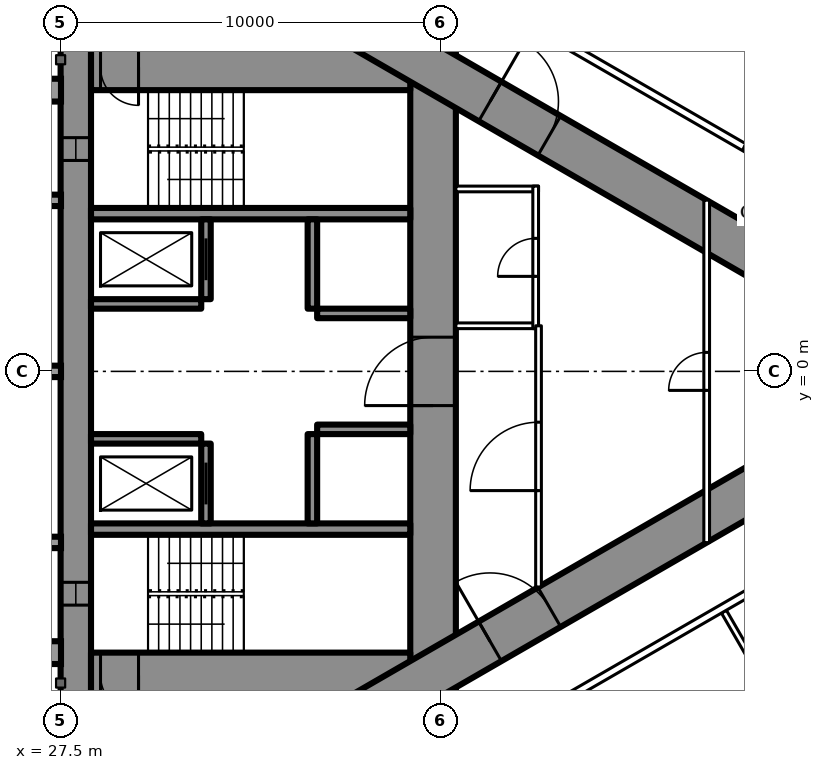
"""IFC4 building model, lengths in metres.
Left out: names, types, materials, properties, quantities, classifications, styles, units other than length and angle.
Written with IfcOpenShell. Run it as: python <this file> out.ifc"""

import sys

from ifc_helpers import new_model, si_unit, direction, frame, frame_2d, origin, place, context, subcontext, project, spatial, rectangle, extrude, element, fill, save


model = new_model("IFC4")
c1 = context("Model", 3, precision=1e-05, world=origin(), true_north=direction((0.0, 1.0)))
c2 = subcontext(c1, "Body", "Model", "MODEL_VIEW")
j1 = project(units=[si_unit("LENGTHUNIT", "METRE"), si_unit("PLANEANGLEUNIT", "RADIAN")], contexts=[c1])
p1 = place(None, origin())
s1 = spatial("IfcSite", under=j1, at=p1, CompositionType="ELEMENT")
p2 = place(p1, origin())
s2 = spatial("IfcBuilding", under=s1, at=p2, CompositionType="ELEMENT")
p3 = place(p2, frame((0.0, 0.0, 136.1)))
s3 = spatial("IfcBuildingStorey", under=s2, at=p3, CompositionType="ELEMENT", Elevation=136.1)
p4 = place(p3, frame((27.9, -8.6, 0.0), z_axis=(0.0, 0.0, 1.0), x_axis=(0.0, 1.0, 0.0)))
e1 = element("IfcWall", 1, at=p4, inside=s3, PredefinedType="SHEAR", context=c2, shape_type="SweptSolid", body=[
    extrude(rectangle(XDim=17.2, YDim=0.8, at=frame_2d((8.6, 0.0))), origin(), (0.0, 0.0, 1.0), 3.5),
])
p5 = place(p4, frame((2.45, 0.0, 0.6)))
e2 = element("IfcOpeningElement", 2, at=p5, cuts=e1, PredefinedType="OPENING", context=c2, shape_type="SweptSolid", body=[
    extrude(rectangle(XDim=0.6, YDim=2.1, at=frame_2d((0.3, 1.05))), frame((0.0, 0.41, 0.0), z_axis=(0.0, -1.0, 0.0), x_axis=(1.0, 0.0, 0.0)), (0.0, 0.0, 1.0), 0.82),
])
p6 = place(p4, frame((14.15, 0.0, 0.6)))
e3 = element("IfcOpeningElement", 3, at=p6, cuts=e1, PredefinedType="OPENING", context=c2, shape_type="SweptSolid", body=[
    extrude(rectangle(XDim=0.6, YDim=2.1, at=frame_2d((0.3, 1.05))), frame((0.0, 0.41, 0.0), z_axis=(0.0, -1.0, 0.0), x_axis=(1.0, 0.0, 0.0)), (0.0, 0.0, 1.0), 0.82),
])
p7 = place(p3, frame((37.3, -8.6, 0.0), z_axis=(0.0, 0.0, 1.0), x_axis=(0.0, 1.0, 0.0)))
e4 = element("IfcWall", 4, at=p7, inside=s3, PredefinedType="SHEAR", context=c2, shape_type="SweptSolid", body=[
    extrude(rectangle(XDim=17.2, YDim=1.2, at=frame_2d((8.6, 0.0))), origin(), (0.0, 0.0, 1.0), 3.5),
])
p8 = place(p7, frame((7.7, 0.0, 0.0)))
e5 = element("IfcOpeningElement", 5, at=p8, cuts=e4, PredefinedType="OPENING", context=c2, shape_type="SweptSolid", body=[
    extrude(rectangle(XDim=1.8, YDim=2.2, at=frame_2d((0.9, 1.1))), frame((0.0, 0.61, 0.0), z_axis=(0.0, -1.0, 0.0), x_axis=(1.0, 0.0, 0.0)), (0.0, 0.0, 1.0), 1.22),
])
p9 = place(p3, frame((28.3, -8.0, 0.0), z_axis=(0.0, 0.0, 1.0), x_axis=(1.0, 0.0, 0.0)))
e6 = element("IfcWall", 6, at=p9, inside=s3, PredefinedType="SHEAR", context=c2, shape_type="SweptSolid", body=[
    extrude(rectangle(XDim=8.4, YDim=1.2, at=frame_2d((4.2, 0.0))), origin(), (0.0, 0.0, 1.0), 3.5),
])
p10 = place(p9, frame((0.25, 0.0, 0.0)))
e7 = element("IfcOpeningElement", 7, at=p10, cuts=e6, PredefinedType="OPENING", context=c2, shape_type="SweptSolid", body=[
    extrude(rectangle(XDim=1.0, YDim=2.2, at=frame_2d((0.5, 1.1))), frame((0.0, 0.61, 0.0), z_axis=(0.0, -1.0, 0.0), x_axis=(1.0, 0.0, 0.0)), (0.0, 0.0, 1.0), 1.22),
])
p11 = place(p3, frame((28.3, 8.0, 0.0), z_axis=(0.0, 0.0, 1.0), x_axis=(1.0, 0.0, 0.0)))
e8 = element("IfcWall", 8, at=p11, inside=s3, PredefinedType="SHEAR", context=c2, shape_type="SweptSolid", body=[
    extrude(rectangle(XDim=8.4, YDim=1.2, at=frame_2d((4.2, 0.0))), origin(), (0.0, 0.0, 1.0), 3.5),
])
p12 = place(p11, frame((0.25, 0.0, 0.0)))
e9 = element("IfcOpeningElement", 9, at=p12, cuts=e8, PredefinedType="OPENING", context=c2, shape_type="SweptSolid", body=[
    extrude(rectangle(XDim=1.0, YDim=2.2, at=frame_2d((0.5, 1.1))), frame((0.0, 0.61, 0.0), z_axis=(0.0, -1.0, 0.0), x_axis=(1.0, 0.0, 0.0)), (0.0, 0.0, 1.0), 1.22),
])
for number, where, z_axis, x_axis in (
    (10, (28.3, -4.15, 0.0), (0.0, 0.0, 1.0), (1.0, 0.0, 0.0)),
    (11, (28.3, 4.15, 0.0), (0.0, 0.0, 1.0), (1.0, 0.0, 0.0)),
):
    element("IfcWall", number, at=place(p3, frame(where, z_axis=z_axis, x_axis=x_axis)), inside=s3, PredefinedType="SHEAR", context=c2, shape_type="SweptSolid", body=[
        extrude(rectangle(XDim=8.4, YDim=0.3, at=frame_2d((4.2, 0.0))), origin(), (0.0, 0.0, 1.0), 3.5),
    ])
p13 = place(p3, frame((31.325, -4.0, 0.0), z_axis=(0.0, 0.0, 1.0), x_axis=(0.0, 1.0, 0.0)))
e12 = element("IfcWall", 12, at=p13, inside=s3, PredefinedType="SHEAR", context=c2, shape_type="SweptSolid", body=[
    extrude(rectangle(XDim=2.1, YDim=0.25, at=frame_2d((1.05, 0.0))), origin(), (0.0, 0.0, 1.0), 3.5),
])
p14 = place(p13, frame((0.5, 0.0, 0.0)))
e13 = element("IfcOpeningElement", 13, at=p14, cuts=e12, PredefinedType="OPENING", context=c2, shape_type="SweptSolid", body=[
    extrude(rectangle(XDim=1.1, YDim=2.2, at=frame_2d((0.55, 1.1))), frame((0.0, 0.135, 0.0), z_axis=(0.0, -1.0, 0.0), x_axis=(1.0, 0.0, 0.0)), (0.0, 0.0, 1.0), 0.27),
])
p15 = place(p3, frame((34.125, -4.0, 0.0), z_axis=(0.0, 0.0, 1.0), x_axis=(0.0, 1.0, 0.0)))
e14 = element("IfcWall", 14, at=p15, inside=s3, PredefinedType="SHEAR", context=c2, shape_type="SweptSolid", body=[
    extrude(rectangle(XDim=2.35, YDim=0.25, at=frame_2d((1.175, 0.0))), origin(), (0.0, 0.0, 1.0), 3.5),
])
p16 = place(p3, frame((28.3, -1.775, 0.0), z_axis=(0.0, 0.0, 1.0), x_axis=(1.0, 0.0, 0.0)))
e15 = element("IfcWall", 15, at=p16, inside=s3, PredefinedType="SHEAR", context=c2, shape_type="SweptSolid", body=[
    extrude(rectangle(XDim=2.9, YDim=0.25, at=frame_2d((1.45, 0.0))), origin(), (0.0, 0.0, 1.0), 3.5),
])
p17 = place(p3, frame((34.25, -1.525, 0.0), z_axis=(0.0, 0.0, 1.0), x_axis=(1.0, 0.0, 0.0)))
e16 = element("IfcWall", 16, at=p17, inside=s3, PredefinedType="SHEAR", context=c2, shape_type="SweptSolid", body=[
    extrude(rectangle(XDim=2.45, YDim=0.25, at=frame_2d((1.225, 0.0))), origin(), (0.0, 0.0, 1.0), 3.5),
])
p18 = place(p3, frame((31.325, 1.9, 0.0), z_axis=(0.0, 0.0, 1.0), x_axis=(0.0, 1.0, 0.0)))
e17 = element("IfcWall", 17, at=p18, inside=s3, PredefinedType="SHEAR", context=c2, shape_type="SweptSolid", body=[
    extrude(rectangle(XDim=2.1, YDim=0.25, at=frame_2d((1.05, 0.0))), origin(), (0.0, 0.0, 1.0), 3.5),
])
p19 = place(p18, frame((0.5, 0.0, 0.0)))
e18 = element("IfcOpeningElement", 18, at=p19, cuts=e17, PredefinedType="OPENING", context=c2, shape_type="SweptSolid", body=[
    extrude(rectangle(XDim=1.1, YDim=2.2, at=frame_2d((0.55, 1.1))), frame((0.0, 0.135, 0.0), z_axis=(0.0, -1.0, 0.0), x_axis=(1.0, 0.0, 0.0)), (0.0, 0.0, 1.0), 0.27),
])
p20 = place(p3, frame((34.125, 1.65, 0.0), z_axis=(0.0, 0.0, 1.0), x_axis=(0.0, 1.0, 0.0)))
e19 = element("IfcWall", 19, at=p20, inside=s3, PredefinedType="SHEAR", context=c2, shape_type="SweptSolid", body=[
    extrude(rectangle(XDim=2.35, YDim=0.25, at=frame_2d((1.175, 0.0))), origin(), (0.0, 0.0, 1.0), 3.5),
])
p21 = place(p3, frame((28.3, 1.775, 0.0), z_axis=(0.0, 0.0, 1.0), x_axis=(1.0, 0.0, 0.0)))
e20 = element("IfcWall", 20, at=p21, inside=s3, PredefinedType="SHEAR", context=c2, shape_type="SweptSolid", body=[
    extrude(rectangle(XDim=2.9, YDim=0.25, at=frame_2d((1.45, 0.0))), origin(), (0.0, 0.0, 1.0), 3.5),
])
p22 = place(p3, frame((34.25, 1.525, 0.0), z_axis=(0.0, 0.0, 1.0), x_axis=(1.0, 0.0, 0.0)))
e21 = element("IfcWall", 21, at=p22, inside=s3, PredefinedType="SHEAR", context=c2, shape_type="SweptSolid", body=[
    extrude(rectangle(XDim=2.45, YDim=0.25, at=frame_2d((1.225, 0.0))), origin(), (0.0, 0.0, 1.0), 3.5),
])
p23 = place(p3, frame((27.2, -13.8, 0.0), z_axis=(0.0, 0.0, 1.0), x_axis=(0.866027159892, 0.499996958321, 0.0)))
e22 = element("IfcWall", 22, at=p23, inside=s3, PredefinedType="SHEAR", context=c2, shape_type="SweptSolid", body=[
    extrude(rectangle(XDim=27.947, YDim=1.2, at=frame_2d((13.973, 0.0))), origin(), (0.0, 0.0, 1.0), 3.5),
])
p24 = place(p23, frame((4.6, 0.0, 0.0)))
e23 = element("IfcOpeningElement", 23, at=p24, cuts=e22, PredefinedType="OPENING", context=c2, shape_type="SweptSolid", body=[
    extrude(rectangle(XDim=1.0, YDim=2.2, at=frame_2d((0.5, 1.1))), frame((0.0, 0.61, 0.0), z_axis=(0.0, -1.0, 0.0), x_axis=(1.0, 0.0, 0.0)), (0.0, 0.0, 1.0), 1.22),
])
p25 = place(p23, frame((13.395, 0.0, 0.0)))
e24 = element("IfcOpeningElement", 24, at=p25, cuts=e22, PredefinedType="OPENING", context=c2, shape_type="SweptSolid", body=[
    extrude(rectangle(XDim=1.8, YDim=2.2, at=frame_2d((0.9, 1.1))), frame((0.0, 0.61, 0.0), z_axis=(0.0, -1.0, 0.0), x_axis=(1.0, 0.0, 0.0)), (0.0, 0.0, 1.0), 1.22),
])
p26 = place(p3, frame((27.2, 13.8, 0.0), z_axis=(0.0, 0.0, 1.0), x_axis=(0.866024515034, -0.500001539357, 0.0)))
e25 = element("IfcWall", 25, at=p26, inside=s3, PredefinedType="SHEAR", context=c2, shape_type="SweptSolid", body=[
    extrude(rectangle(XDim=26.907, YDim=1.2, at=frame_2d((13.454, 0.0))), origin(), (0.0, 0.0, 1.0), 3.5),
])
p27 = place(p26, frame((4.6, 0.0, 0.0)))
e26 = element("IfcOpeningElement", 26, at=p27, cuts=e25, PredefinedType="OPENING", context=c2, shape_type="SweptSolid", body=[
    extrude(rectangle(XDim=1.0, YDim=2.2, at=frame_2d((0.5, 1.1))), frame((0.0, 0.61, 0.0), z_axis=(0.0, -1.0, 0.0), x_axis=(1.0, 0.0, 0.0)), (0.0, 0.0, 1.0), 1.22),
])
p28 = place(p26, frame((13.395, 0.0, 0.0)))
e27 = element("IfcOpeningElement", 27, at=p28, cuts=e25, PredefinedType="OPENING", context=c2, shape_type="SweptSolid", body=[
    extrude(rectangle(XDim=1.8, YDim=2.2, at=frame_2d((0.9, 1.1))), frame((0.0, 0.61, 0.0), z_axis=(0.0, -1.0, 0.0), x_axis=(1.0, 0.0, 0.0)), (0.0, 0.0, 1.0), 1.22),
])
p29 = place(p3, frame((44.954, -6.321, 0.0), z_axis=(0.0, 0.0, 1.0), x_axis=(0.500018676722, -0.866014620505, 0.0)))
e28 = element("IfcWall", 28, at=p29, inside=s3, PredefinedType="PARTITIONING", context=c2, shape_type="SweptSolid", body=[
    extrude(rectangle(XDim=8.704, YDim=0.15, at=frame_2d((4.352, 0.0))), origin(), (0.0, 0.0, 1.0), 2.2),
])
p30 = place(p3, frame((37.96, -10.243, 0.0), z_axis=(0.0, 0.0, 1.0), x_axis=(0.866026429433, 0.499998223521, 0.0)))
e29 = element("IfcWall", 29, at=p30, inside=s3, PredefinedType="PARTITIONING", context=c2, shape_type="SweptSolid", body=[
    extrude(rectangle(XDim=20.487, YDim=0.2, at=frame_2d((10.243, 0.0))), origin(), (0.0, 0.0, 1.0), 3.25),
])
p31 = place(p30, frame((10.743, 0.0, 0.0)))
e30 = element("IfcOpeningElement", 30, at=p31, cuts=e29, PredefinedType="OPENING", context=c2, shape_type="SweptSolid", body=[
    extrude(rectangle(XDim=0.95, YDim=2.2, at=frame_2d((0.475, 1.1))), frame((0.0, 0.11, 0.0), z_axis=(0.0, -1.0, 0.0), x_axis=(1.0, 0.0, 0.0)), (0.0, 0.0, 1.0), 0.22),
])
p32 = place(p30, frame((17.586, 0.0, 0.0)))
e31 = element("IfcOpeningElement", 31, at=p32, cuts=e29, PredefinedType="OPENING", context=c2, shape_type="SweptSolid", body=[
    extrude(rectangle(XDim=1.8, YDim=2.2, at=frame_2d((0.9, 1.1))), frame((0.0, 0.11, 0.0), z_axis=(0.0, -1.0, 0.0), x_axis=(1.0, 0.0, 0.0)), (0.0, 0.0, 1.0), 0.22),
])
p33 = place(p30, frame((0.6, 0.0, 0.0)))
e32 = element("IfcOpeningElement", 32, at=p33, cuts=e29, PredefinedType="OPENING", context=c2, shape_type="SweptSolid", body=[
    extrude(rectangle(XDim=0.95, YDim=2.2, at=frame_2d((0.475, 1.1))), frame((0.0, 0.11, 0.0), z_axis=(0.0, -1.0, 0.0), x_axis=(1.0, 0.0, 0.0)), (0.0, 0.0, 1.0), 0.22),
])
p34 = place(p3, frame((36.834, 10.894, 0.0), z_axis=(0.0, 0.0, 1.0), x_axis=(0.866028157229, -0.499995230863, 0.0)))
e33 = element("IfcWall", 33, at=p34, inside=s3, PredefinedType="PARTITIONING", context=c2, shape_type="SweptSolid", body=[
    extrude(rectangle(XDim=21.667, YDim=0.2, at=frame_2d((10.833, 0.0))), origin(), (0.0, 0.0, 1.0), 3.25),
])
p35 = place(p34, frame((20.117, 0.0, 0.0)))
e34 = element("IfcOpeningElement", 34, at=p35, cuts=e33, PredefinedType="OPENING", context=c2, shape_type="SweptSolid", body=[
    extrude(rectangle(XDim=0.95, YDim=2.2, at=frame_2d((0.475, 1.1))), frame((0.0, 0.11, 0.0), z_axis=(0.0, -1.0, 0.0), x_axis=(1.0, 0.0, 0.0)), (0.0, 0.0, 1.0), 0.22),
])
p36 = place(p34, frame((14.938, 0.0, 0.0)))
e35 = element("IfcOpeningElement", 35, at=p36, cuts=e33, PredefinedType="OPENING", context=c2, shape_type="SweptSolid", body=[
    extrude(rectangle(XDim=1.8, YDim=2.2, at=frame_2d((0.9, 1.1))), frame((0.0, 0.11, 0.0), z_axis=(0.0, -1.0, 0.0), x_axis=(1.0, 0.0, 0.0)), (0.0, 0.0, 1.0), 0.22),
])
p37 = place(p34, frame((9.99, 0.0, 0.0)))
e36 = element("IfcOpeningElement", 36, at=p37, cuts=e33, PredefinedType="OPENING", context=c2, shape_type="SweptSolid", body=[
    extrude(rectangle(XDim=0.95, YDim=2.2, at=frame_2d((0.475, 1.1))), frame((0.0, 0.11, 0.0), z_axis=(0.0, -1.0, 0.0), x_axis=(1.0, 0.0, 0.0)), (0.0, 0.0, 1.0), 0.22),
])
p38 = place(p34, frame((3.35, 0.0, 0.0)))
e37 = element("IfcOpeningElement", 37, at=p38, cuts=e33, PredefinedType="OPENING", context=c2, shape_type="SweptSolid", body=[
    extrude(rectangle(XDim=1.0, YDim=2.2, at=frame_2d((0.5, 1.1))), frame((0.0, 0.11, 0.0), z_axis=(0.0, -1.0, 0.0), x_axis=(1.0, 0.0, 0.0)), (0.0, 0.0, 1.0), 0.22),
])
for number, where, z_axis, x_axis in (
    (38, (37.9, 1.2, 0.0), (0.0, 0.0, 1.0), (1.0, 0.0, 0.0)),
    (39, (37.9, 4.8, 0.0), (0.0, 0.0, 1.0), (1.0, 0.0, 0.0)),
):
    element("IfcWall", number, at=place(p3, frame(where, z_axis=z_axis, x_axis=x_axis)), inside=s3, PredefinedType="PARTITIONING", context=c2, shape_type="SweptSolid", body=[
        extrude(rectangle(XDim=2.175, YDim=0.15, at=frame_2d((1.087, 0.0))), origin(), (0.0, 0.0, 1.0), 3.25),
    ])
p39 = place(p3, frame((40.0, 1.125, 0.0), z_axis=(0.0, 0.0, 1.0), x_axis=(0.0, 1.0, 0.0)))
e40 = element("IfcWall", 40, at=p39, inside=s3, PredefinedType="PARTITIONING", context=c2, shape_type="SweptSolid", body=[
    extrude(rectangle(XDim=3.75, YDim=0.15, at=frame_2d((1.875, 0.0))), origin(), (0.0, 0.0, 1.0), 3.25),
])
p40 = place(p39, frame((1.375, 0.0, 0.0)))
e41 = element("IfcOpeningElement", 41, at=p40, cuts=e40, PredefinedType="OPENING", context=c2, shape_type="SweptSolid", body=[
    extrude(rectangle(XDim=1.0, YDim=2.2, at=frame_2d((0.5, 1.1))), frame((0.0, 0.085, 0.0), z_axis=(0.0, -1.0, 0.0), x_axis=(1.0, 0.0, 0.0)), (0.0, 0.0, 1.0), 0.17),
])
p41 = place(p3, frame((40.075, -5.674, 0.0), z_axis=(0.0, 0.0, 1.0), x_axis=(0.0, 1.0, 0.0)))
e42 = element("IfcWall", 42, at=p41, inside=s3, PredefinedType="PARTITIONING", context=c2, shape_type="SweptSolid", body=[
    extrude(rectangle(XDim=6.874, YDim=0.15, at=frame_2d((3.437, 0.0))), origin(), (0.0, 0.0, 1.0), 3.25),
])
p42 = place(p41, frame((2.537, 0.0, 0.0)))
e43 = element("IfcOpeningElement", 43, at=p42, cuts=e42, PredefinedType="OPENING", context=c2, shape_type="SweptSolid", body=[
    extrude(rectangle(XDim=1.8, YDim=2.2, at=frame_2d((0.9, 1.1))), frame((0.0, 0.085, 0.0), z_axis=(0.0, -1.0, 0.0), x_axis=(1.0, 0.0, 0.0)), (0.0, 0.0, 1.0), 0.17),
])
p43 = place(p3, frame((44.5, -4.505, 0.0), z_axis=(0.0, 0.0, 1.0), x_axis=(0.0, 1.0, 0.0)))
e44 = element("IfcWall", 44, at=p43, inside=s3, PredefinedType="PARTITIONING", context=c2, shape_type="SweptSolid", body=[
    extrude(rectangle(XDim=9.009, YDim=0.15, at=frame_2d((4.505, 0.0))), origin(), (0.0, 0.0, 1.0), 2.45),
])
p44 = place(p43, frame((4.005, 0.0, 0.0)))
e45 = element("IfcOpeningElement", 45, at=p44, cuts=e44, PredefinedType="OPENING", context=c2, shape_type="SweptSolid", body=[
    extrude(rectangle(XDim=1.0, YDim=2.2, at=frame_2d((0.5, 1.1))), frame((0.0, 0.085, 0.0), z_axis=(0.0, -1.0, 0.0), x_axis=(1.0, 0.0, 0.0)), (0.0, 0.0, 1.0), 0.17),
])
p45 = place(p37, origin())
e46 = element("IfcDoor", 46, at=p45, inside=s3, OperationType="SINGLE_SWING_LEFT", PredefinedType="DOOR", context=c2, shape_type="SweptSolid", body=[
    extrude(rectangle(XDim=0.95, YDim=2.2, at=frame_2d((0.475, 1.1))), frame((0.0, 0.025, 0.0), z_axis=(0.0, -1.0, 0.0), x_axis=(1.0, 0.0, 0.0)), (0.0, 0.0, 1.0), 0.05),
])
fill(e36, e46)
p46 = place(p40, origin())
e47 = element("IfcDoor", 47, at=p46, inside=s3, OperationType="SINGLE_SWING_LEFT", PredefinedType="DOOR", context=c2, shape_type="SweptSolid", body=[
    extrude(rectangle(XDim=1.0, YDim=2.2, at=frame_2d((0.5, 1.1))), frame((0.0, 0.025, 0.0), z_axis=(0.0, -1.0, 0.0), x_axis=(1.0, 0.0, 0.0)), (0.0, 0.0, 1.0), 0.05),
])
fill(e41, e47)
p47 = place(p42, origin())
e48 = element("IfcDoor", 48, at=p47, inside=s3, OperationType="DOUBLE_DOOR_SINGLE_SWING", PredefinedType="DOOR", context=c2, shape_type="SweptSolid", body=[
    extrude(rectangle(XDim=1.8, YDim=2.2, at=frame_2d((0.9, 1.1))), frame((0.0, 0.025, 0.0), z_axis=(0.0, -1.0, 0.0), x_axis=(1.0, 0.0, 0.0)), (0.0, 0.0, 1.0), 0.05),
])
fill(e43, e48)
p48 = place(p44, origin())
e49 = element("IfcDoor", 49, at=p48, inside=s3, OperationType="SINGLE_SWING_LEFT", PredefinedType="DOOR", context=c2, shape_type="SweptSolid", body=[
    extrude(rectangle(XDim=1.0, YDim=2.2, at=frame_2d((0.5, 1.1))), frame((0.0, 0.025, 0.0), z_axis=(0.0, -1.0, 0.0), x_axis=(1.0, 0.0, 0.0)), (0.0, 0.0, 1.0), 0.05),
])
fill(e45, e49)
p49 = place(p25, origin())
e50 = element("IfcDoor", 50, at=p49, inside=s3, OperationType="DOUBLE_DOOR_SINGLE_SWING", PredefinedType="DOOR", context=c2, shape_type="SweptSolid", body=[
    extrude(rectangle(XDim=1.8, YDim=2.2, at=frame_2d((0.9, 1.1))), frame((0.0, 0.025, 0.0), z_axis=(0.0, -1.0, 0.0), x_axis=(1.0, 0.0, 0.0)), (0.0, 0.0, 1.0), 0.05),
])
fill(e24, e50)
p50 = place(p28, origin())
e51 = element("IfcDoor", 51, at=p50, inside=s3, OperationType="DOUBLE_DOOR_SINGLE_SWING", PredefinedType="DOOR", context=c2, shape_type="SweptSolid", body=[
    extrude(rectangle(XDim=1.8, YDim=2.2, at=frame_2d((0.9, 1.1))), frame((0.0, 0.025, 0.0), z_axis=(0.0, -1.0, 0.0), x_axis=(1.0, 0.0, 0.0)), (0.0, 0.0, 1.0), 0.05),
])
fill(e27, e51)
p51 = place(p8, origin())
e52 = element("IfcDoor", 52, at=p51, inside=s3, OperationType="DOUBLE_DOOR_SINGLE_SWING", PredefinedType="DOOR", context=c2, shape_type="SweptSolid", body=[
    extrude(rectangle(XDim=1.8, YDim=2.2, at=frame_2d((0.9, 1.1))), frame((0.0, 0.025, 0.0), z_axis=(0.0, -1.0, 0.0), x_axis=(1.0, 0.0, 0.0)), (0.0, 0.0, 1.0), 0.05),
])
fill(e5, e52)
p52 = place(p10, origin())
e53 = element("IfcDoor", 53, at=p52, inside=s3, OperationType="SINGLE_SWING_RIGHT", PredefinedType="DOOR", context=c2, shape_type="SweptSolid", body=[
    extrude(rectangle(XDim=1.0, YDim=2.2, at=frame_2d((0.5, 1.1))), frame((0.0, 0.025, 0.0), z_axis=(0.0, -1.0, 0.0), x_axis=(1.0, 0.0, 0.0)), (0.0, 0.0, 1.0), 0.05),
])
fill(e7, e53)
p53 = place(p12, origin())
e54 = element("IfcDoor", 54, at=p53, inside=s3, OperationType="SINGLE_SWING_RIGHT", PredefinedType="DOOR", context=c2, shape_type="SweptSolid", body=[
    extrude(rectangle(XDim=1.0, YDim=2.2, at=frame_2d((0.5, 1.1))), frame((0.0, 0.025, 0.0), z_axis=(0.0, -1.0, 0.0), x_axis=(1.0, 0.0, 0.0)), (0.0, 0.0, 1.0), 0.05),
])
fill(e9, e54)
p54 = place(p14, origin())
e55 = element("IfcDoor", 55, at=p54, inside=s3, OperationType="SLIDING_TO_LEFT", PredefinedType="USERDEFINED", context=c2, shape_type="SweptSolid", body=[
    extrude(rectangle(XDim=1.1, YDim=2.2, at=frame_2d((0.55, 1.1))), frame((0.0, 0.025, 0.0), z_axis=(0.0, -1.0, 0.0), x_axis=(1.0, 0.0, 0.0)), (0.0, 0.0, 1.0), 0.05),
])
fill(e13, e55)
p55 = place(p19, origin())
e56 = element("IfcDoor", 56, at=p55, inside=s3, OperationType="SLIDING_TO_LEFT", PredefinedType="USERDEFINED", context=c2, shape_type="SweptSolid", body=[
    extrude(rectangle(XDim=1.1, YDim=2.2, at=frame_2d((0.55, 1.1))), frame((0.0, 0.025, 0.0), z_axis=(0.0, -1.0, 0.0), x_axis=(1.0, 0.0, 0.0)), (0.0, 0.0, 1.0), 0.05),
])
fill(e18, e56)
p56 = place(p5, origin())
e57 = element("IfcWindow", 57, at=p56, inside=s3, PartitioningType="SINGLE_PANEL", PredefinedType="WINDOW", context=c2, shape_type="SweptSolid", body=[
    extrude(rectangle(XDim=0.6, YDim=2.1, at=frame_2d((0.3, 1.05))), frame((0.0, 0.03, 0.0), z_axis=(0.0, -1.0, 0.0), x_axis=(1.0, 0.0, 0.0)), (0.0, 0.0, 1.0), 0.06),
])
fill(e2, e57)
p57 = place(p6, origin())
e58 = element("IfcWindow", 58, at=p57, inside=s3, PartitioningType="SINGLE_PANEL", PredefinedType="WINDOW", context=c2, shape_type="SweptSolid", body=[
    extrude(rectangle(XDim=0.6, YDim=2.1, at=frame_2d((0.3, 1.05))), frame((0.0, 0.03, 0.0), z_axis=(0.0, -1.0, 0.0), x_axis=(1.0, 0.0, 0.0)), (0.0, 0.0, 1.0), 0.06),
])
fill(e3, e58)
save(model, sys.argv[1])
